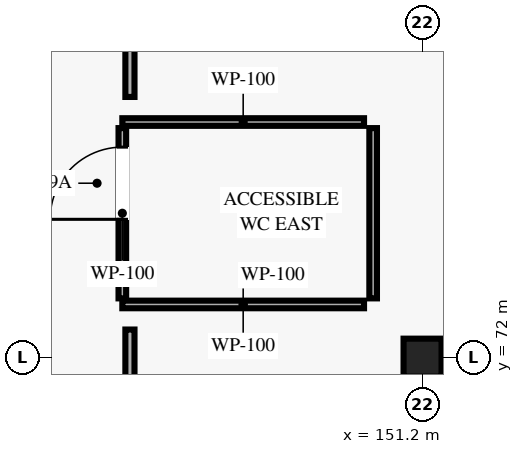
"""IFC4 building model, lengths in metres.
Left out: names, types, materials, properties, quantities, classifications, styles, units other than length and angle.
Written with IfcOpenShell. Run it as: python <this file> out.ifc"""

import sys

from ifc_helpers import new_model, si_unit, direction, frame, frame_2d, origin, origin_2d, place, context, subcontext, project, spatial, rectangle, extrude, element, fill, save


model = new_model("IFC4")
c1 = context("Model", 3, precision=1e-05, world=origin(), true_north=direction((0.0, 1.0)))
c2 = subcontext(c1, "Body", "Model", "MODEL_VIEW")
j1 = project(units=[si_unit("LENGTHUNIT", "METRE"), si_unit("PLANEANGLEUNIT", "RADIAN")], contexts=[c1])
p1 = place(None, origin())
s1 = spatial("IfcSite", under=j1, at=p1, CompositionType="ELEMENT")
p2 = place(p1, origin())
s2 = spatial("IfcBuilding", under=s1, at=p2, CompositionType="ELEMENT")
p3 = place(p2, frame((0.0, 0.0, 25.65)))
s3 = spatial("IfcBuildingStorey", under=s2, at=p3, CompositionType="ELEMENT", Elevation=25.65)
p4 = place(p3, frame((151.2, 72.0, 0.0), z_axis=(0.0, 0.0, 1.0), x_axis=(1.0, 0.0, 0.0)))
e1 = element("IfcColumn", 1, at=p4, inside=s3, PredefinedType="COLUMN", context=c2, shape_type="SweptSolid", body=[
    extrude(rectangle(XDim=0.5, YDim=0.5, at=origin_2d()), origin(), (0.0, 0.0, 1.0), 4.05),
])
p5 = place(p3, frame((147.25, 72.78, 0.0), z_axis=(0.0, 0.0, 1.0), x_axis=(0.0, 1.0, 0.0)))
e2 = element("IfcWall", 2, at=p5, inside=s3, PredefinedType="PARTITIONING", context=c2, shape_type="SweptSolid", body=[
    extrude(rectangle(XDim=2.24, YDim=0.1, at=frame_2d((1.12, 0.0))), origin(), (0.0, 0.0, 1.0), 3.83),
])
p6 = place(p5, frame((1.04, 0.0, 0.0)))
e3 = element("IfcOpeningElement", 3, at=p6, cuts=e2, PredefinedType="OPENING", context=c2, shape_type="SweptSolid", body=[
    extrude(rectangle(XDim=0.95, YDim=2.1, at=frame_2d((0.475, 1.05))), frame((0.0, 0.06, 0.0), z_axis=(0.0, -1.0, 0.0), x_axis=(1.0, 0.0, 0.0)), (0.0, 0.0, 1.0), 0.12),
])
for number, where, z_axis, x_axis in (
    (4, (147.25, 72.7, 0.0), (0.0, 0.0, 1.0), (1.0, 0.0, 0.0)),
    (5, (147.25, 75.1, 0.0), (0.0, 0.0, 1.0), (1.0, 0.0, 0.0)),
):
    element("IfcWall", number, at=place(p3, frame(where, z_axis=z_axis, x_axis=x_axis)), inside=s3, PredefinedType="PARTITIONING", context=c2, shape_type="SweptSolid", body=[
        extrude(rectangle(XDim=3.18, YDim=0.1, at=frame_2d((1.59, 0.0))), origin(), (0.0, 0.0, 1.0), 3.83),
    ])
p7 = place(p3, frame((150.55, 72.78, 0.0), z_axis=(0.0, 0.0, 1.0), x_axis=(0.0, 1.0, 0.0)))
e6 = element("IfcWall", 6, at=p7, inside=s3, PredefinedType="PARTITIONING", context=c2, shape_type="SweptSolid", body=[
    extrude(rectangle(XDim=2.24, YDim=0.1, at=frame_2d((1.12, 0.0))), origin(), (0.0, 0.0, 1.0), 3.83),
])
p8 = place(p3, frame((147.35, 75.43, 0.0), z_axis=(0.0, 0.0, 1.0), x_axis=(0.0, 1.0, 0.0)))
e7 = element("IfcWall", 7, at=p8, inside=s3, PredefinedType="PARTITIONING", context=c2, shape_type="SweptSolid", body=[
    extrude(rectangle(XDim=24.72, YDim=0.12, at=frame_2d((12.36, 0.0))), origin(), (0.0, 0.0, 1.0), 3.83),
])
p9 = place(p8, frame((6.784, 0.0, 0.0)))
e8 = element("IfcOpeningElement", 8, at=p9, cuts=e7, PredefinedType="OPENING", context=c2, shape_type="SweptSolid", body=[
    extrude(rectangle(XDim=1.1, YDim=2.2, at=frame_2d((0.55, 1.1))), frame((0.0, 0.07, 0.0), z_axis=(0.0, -1.0, 0.0), x_axis=(1.0, 0.0, 0.0)), (0.0, 0.0, 1.0), 0.14),
])
p10 = place(p3, frame((147.35, 57.15, 0.0), z_axis=(0.0, 0.0, 1.0), x_axis=(0.0, 1.0, 0.0)))
e9 = element("IfcWall", 9, at=p10, inside=s3, PredefinedType="PARTITIONING", context=c2, shape_type="SweptSolid", body=[
    extrude(rectangle(XDim=15.22, YDim=0.12, at=frame_2d((7.61, 0.0))), origin(), (0.0, 0.0, 1.0), 3.83),
])
p11 = place(p6, origin())
e10 = element("IfcDoor", 10, at=p11, inside=s3, OperationType="SINGLE_SWING_LEFT", PredefinedType="DOOR", context=c2, shape_type="SweptSolid", body=[
    extrude(rectangle(XDim=0.95, YDim=2.1, at=frame_2d((0.475, 1.05))), frame((0.0, 0.025, 0.0), z_axis=(0.0, -1.0, 0.0), x_axis=(1.0, 0.0, 0.0)), (0.0, 0.0, 1.0), 0.05),
])
fill(e3, e10)
save(model, sys.argv[1])
